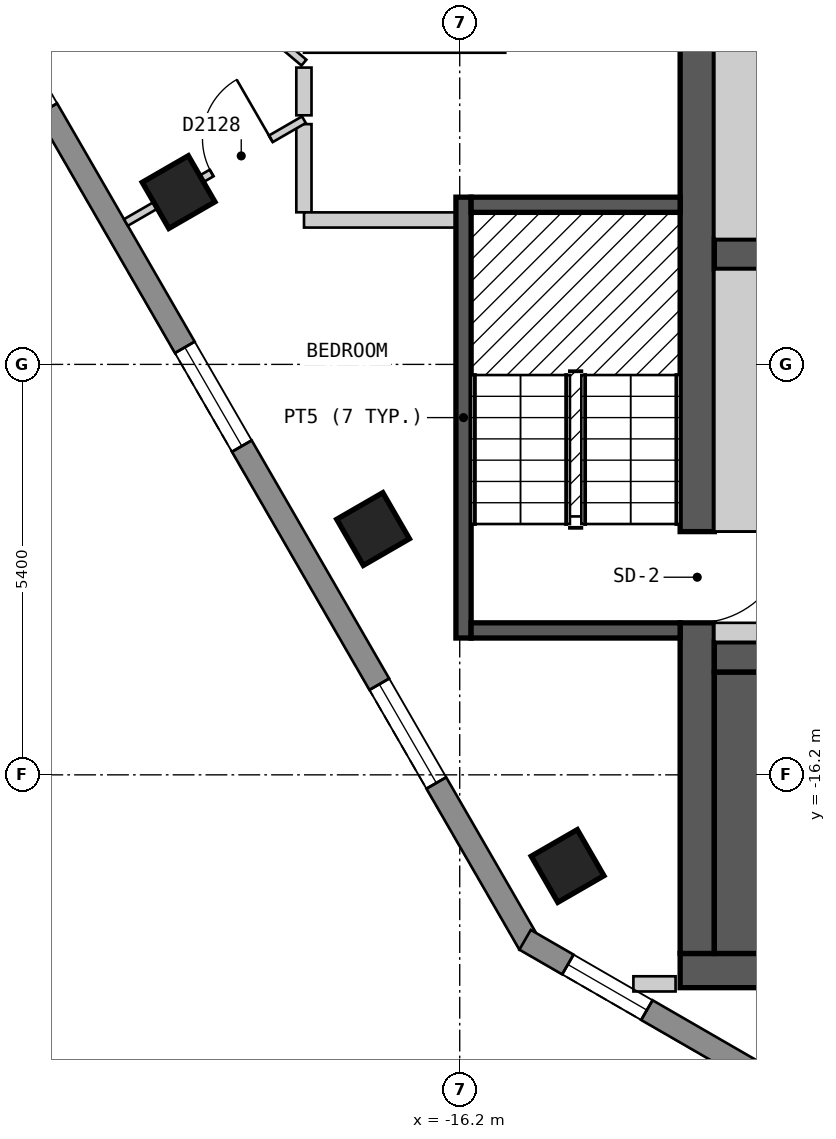
"""IFC4 building model, lengths in metres.
Left out: names, types, materials, properties, quantities, classifications, styles, units other than length and angle.
Written with IfcOpenShell. Run it as: python <this file> out.ifc"""

import sys

from ifc_helpers import new_model, si_unit, direction, frame, frame_2d, origin, origin_2d, place, context, subcontext, project, spatial, polyline, rectangle, outline, extrude, element, fill, save


model = new_model("IFC4")
c1 = context("Model", 3, precision=1e-05, world=origin(), true_north=direction((0.0, 1.0)))
c2 = subcontext(c1, "Body", "Model", "MODEL_VIEW")
j1 = project(units=[si_unit("LENGTHUNIT", "METRE"), si_unit("PLANEANGLEUNIT", "RADIAN")], contexts=[c1])
p1 = place(None, origin())
s1 = spatial("IfcSite", under=j1, at=p1, CompositionType="ELEMENT")
p2 = place(p1, origin())
s2 = spatial("IfcBuilding", under=s1, at=p2, CompositionType="ELEMENT")
p3 = place(p2, frame((0.0, 0.0, 211.8)))
s3 = spatial("IfcBuildingStorey", under=s2, at=p3, CompositionType="ELEMENT", Elevation=211.8)
for number, where, z_axis, x_axis in (
    (1, (-19.899, -8.533, 0.0), (0.0, 0.0, 1.0), (0.5, -0.866, 0.0)),
    (2, (-17.34, -12.966, 0.0), (0.0, 0.0, 1.0), (0.5, -0.866, 0.0)),
    (3, (-14.781, -17.399, 0.0), (0.0, 0.0, 1.0), (0.5, -0.866, 0.0)),
):
    element("IfcColumn", number, at=place(p3, frame(where, z_axis=z_axis, x_axis=x_axis)), inside=s3, PredefinedType="COLUMN", context=c2, shape_type="SweptSolid", body=[
        extrude(rectangle(XDim=0.7, YDim=0.7, at=origin_2d()), origin(), (0.0, 0.0, 1.0), 3.0),
    ])
p4 = place(p3, frame((-13.3, -18.775, 0.0), z_axis=(0.0, 0.0, 1.0), x_axis=(1.0, 0.0, 0.0)))
e4 = element("IfcWall", 4, at=p4, inside=s3, PredefinedType="SHEAR", context=c2, shape_type="SweptSolid", body=[
    extrude(rectangle(XDim=26.6, YDim=0.45, at=frame_2d((13.3, 0.0))), origin(), (0.0, 0.0, 1.0), 2.7),
])
p5 = place(p4, frame((10.25, 0.0, 0.0)))
e5 = element("IfcOpeningElement", 5, at=p5, cuts=e4, PredefinedType="OPENING", context=c2, shape_type="SweptSolid", body=[
    extrude(rectangle(XDim=0.9, YDim=2.1, at=frame_2d((0.45, 1.05))), frame((0.0, 0.235, 0.0), z_axis=(0.0, -1.0, 0.0), x_axis=(1.0, 0.0, 0.0)), (0.0, 0.0, 1.0), 0.47),
])
p6 = place(p3, frame((-13.075, -18.55, 0.0), z_axis=(0.0, 0.0, 1.0), x_axis=(0.0, 1.0, 0.0)))
e6 = element("IfcWall", 6, at=p6, inside=s3, PredefinedType="SHEAR", context=c2, shape_type="SweptSolid", body=[
    extrude(rectangle(XDim=13.1, YDim=0.45, at=frame_2d((6.55, 0.0))), origin(), (0.0, 0.0, 1.0), 2.7),
])
p7 = place(p6, frame((4.35, 0.0, 0.0)))
e7 = element("IfcOpeningElement", 7, at=p7, cuts=e6, PredefinedType="OPENING", context=c2, shape_type="SweptSolid", body=[
    extrude(rectangle(XDim=1.2, YDim=2.1, at=frame_2d((0.6, 1.05))), frame((0.0, 0.235, 0.0), z_axis=(0.0, -1.0, 0.0), x_axis=(1.0, 0.0, 0.0)), (0.0, 0.0, 1.0), 0.47),
])
p8 = place(p3, frame((-12.85, -14.65, 0.0), z_axis=(0.0, 0.0, 1.0), x_axis=(1.0, 0.0, 0.0)))
e8 = element("IfcWall", 8, at=p8, inside=s3, PredefinedType="SHEAR", context=c2, shape_type="SweptSolid", body=[
    extrude(rectangle(XDim=25.7, YDim=0.4, at=frame_2d((12.85, 0.0))), origin(), (0.0, 0.0, 1.0), 2.7),
])
p9 = place(p8, frame((2.05, 0.0, 0.0), z_axis=(0.0, 0.0, 1.0), x_axis=(-1.0, 0.0, 0.0)))
e9 = element("IfcOpeningElement", 9, at=p9, cuts=e8, PredefinedType="OPENING", context=c2, shape_type="SweptSolid", body=[
    extrude(rectangle(XDim=1.2, YDim=2.1, at=frame_2d((0.6, 1.05))), frame((0.0, 0.21, 0.0), z_axis=(0.0, -1.0, 0.0), x_axis=(1.0, 0.0, 0.0)), (0.0, 0.0, 1.0), 0.42),
])
p10 = place(p8, frame((24.9, 0.0, 0.0), z_axis=(0.0, 0.0, 1.0), x_axis=(-1.0, 0.0, 0.0)))
e10 = element("IfcOpeningElement", 10, at=p10, cuts=e8, PredefinedType="OPENING", context=c2, shape_type="SweptSolid", body=[
    extrude(rectangle(XDim=1.2, YDim=2.1, at=frame_2d((0.6, 1.05))), frame((0.0, 0.21, 0.0), z_axis=(0.0, -1.0, 0.0), x_axis=(1.0, 0.0, 0.0)), (0.0, 0.0, 1.0), 0.42),
])
p11 = place(p8, frame((10.0, 0.0, 0.0), z_axis=(0.0, 0.0, 1.0), x_axis=(-1.0, 0.0, 0.0)))
e11 = element("IfcOpeningElement", 11, at=p11, cuts=e8, PredefinedType="OPENING", context=c2, shape_type="SweptSolid", body=[
    extrude(rectangle(XDim=1.0, YDim=2.1, at=frame_2d((0.5, 1.05))), frame((0.0, 0.21, 0.0), z_axis=(0.0, -1.0, 0.0), x_axis=(1.0, 0.0, 0.0)), (0.0, 0.0, 1.0), 0.42),
])
p12 = place(p8, frame((16.4, 0.0, 0.0), z_axis=(0.0, 0.0, 1.0), x_axis=(-1.0, 0.0, 0.0)))
e12 = element("IfcOpeningElement", 12, at=p12, cuts=e8, PredefinedType="OPENING", context=c2, shape_type="SweptSolid", body=[
    extrude(rectangle(XDim=1.0, YDim=2.1, at=frame_2d((0.5, 1.05))), frame((0.0, 0.21, 0.0), z_axis=(0.0, -1.0, 0.0), x_axis=(1.0, 0.0, 0.0)), (0.0, 0.0, 1.0), 0.42),
])
p13 = place(p3, frame((-12.85, -9.35, 0.0), z_axis=(0.0, 0.0, 1.0), x_axis=(1.0, 0.0, 0.0)))
e13 = element("IfcWall", 13, at=p13, inside=s3, PredefinedType="SHEAR", context=c2, shape_type="SweptSolid", body=[
    extrude(rectangle(XDim=23.05, YDim=0.4, at=frame_2d((11.525, 0.0))), origin(), (0.0, 0.0, 1.0), 2.7),
])
p14 = place(p13, frame((1.45, 0.0, 0.0)))
e14 = element("IfcOpeningElement", 14, at=p14, cuts=e13, PredefinedType="OPENING", context=c2, shape_type="SweptSolid", body=[
    extrude(rectangle(XDim=1.1, YDim=2.1, at=frame_2d((0.55, 1.05))), frame((0.0, 0.21, 0.0), z_axis=(0.0, -1.0, 0.0), x_axis=(1.0, 0.0, 0.0)), (0.0, 0.0, 1.0), 0.42),
])
p15 = place(p13, frame((4.25, 0.0, 0.0)))
e15 = element("IfcOpeningElement", 15, at=p15, cuts=e13, PredefinedType="OPENING", context=c2, shape_type="SweptSolid", body=[
    extrude(rectangle(XDim=1.1, YDim=2.1, at=frame_2d((0.55, 1.05))), frame((0.0, 0.21, 0.0), z_axis=(0.0, -1.0, 0.0), x_axis=(1.0, 0.0, 0.0)), (0.0, 0.0, 1.0), 0.42),
])
p16 = place(p13, frame((7.05, 0.0, 0.0)))
e16 = element("IfcOpeningElement", 16, at=p16, cuts=e13, PredefinedType="OPENING", context=c2, shape_type="SweptSolid", body=[
    extrude(rectangle(XDim=1.1, YDim=2.1, at=frame_2d((0.55, 1.05))), frame((0.0, 0.21, 0.0), z_axis=(0.0, -1.0, 0.0), x_axis=(1.0, 0.0, 0.0)), (0.0, 0.0, 1.0), 0.42),
])
p17 = place(p13, frame((9.35, 0.0, 0.0)))
e17 = element("IfcOpeningElement", 17, at=p17, cuts=e13, PredefinedType="OPENING", context=c2, shape_type="SweptSolid", body=[
    extrude(rectangle(XDim=1.1, YDim=2.1, at=frame_2d((0.55, 1.05))), frame((0.0, 0.21, 0.0), z_axis=(0.0, -1.0, 0.0), x_axis=(1.0, 0.0, 0.0)), (0.0, 0.0, 1.0), 0.42),
])
p18 = place(p13, frame((11.65, 0.0, 0.0)))
e18 = element("IfcOpeningElement", 18, at=p18, cuts=e13, PredefinedType="OPENING", context=c2, shape_type="SweptSolid", body=[
    extrude(rectangle(XDim=1.1, YDim=2.1, at=frame_2d((0.55, 1.05))), frame((0.0, 0.21, 0.0), z_axis=(0.0, -1.0, 0.0), x_axis=(1.0, 0.0, 0.0)), (0.0, 0.0, 1.0), 0.42),
])
p19 = place(p13, frame((13.95, 0.0, 0.0)))
e19 = element("IfcOpeningElement", 19, at=p19, cuts=e13, PredefinedType="OPENING", context=c2, shape_type="SweptSolid", body=[
    extrude(rectangle(XDim=1.1, YDim=2.1, at=frame_2d((0.55, 1.05))), frame((0.0, 0.21, 0.0), z_axis=(0.0, -1.0, 0.0), x_axis=(1.0, 0.0, 0.0)), (0.0, 0.0, 1.0), 0.42),
])
p20 = place(p13, frame((16.25, 0.0, 0.0)))
e20 = element("IfcOpeningElement", 20, at=p20, cuts=e13, PredefinedType="OPENING", context=c2, shape_type="SweptSolid", body=[
    extrude(rectangle(XDim=1.1, YDim=2.1, at=frame_2d((0.55, 1.05))), frame((0.0, 0.21, 0.0), z_axis=(0.0, -1.0, 0.0), x_axis=(1.0, 0.0, 0.0)), (0.0, 0.0, 1.0), 0.42),
])
p21 = place(p13, frame((18.55, 0.0, 0.0)))
e21 = element("IfcOpeningElement", 21, at=p21, cuts=e13, PredefinedType="OPENING", context=c2, shape_type="SweptSolid", body=[
    extrude(rectangle(XDim=1.1, YDim=2.1, at=frame_2d((0.55, 1.05))), frame((0.0, 0.21, 0.0), z_axis=(0.0, -1.0, 0.0), x_axis=(1.0, 0.0, 0.0)), (0.0, 0.0, 1.0), 0.42),
])
p22 = place(p13, frame((20.95, 0.0, 0.0)))
e22 = element("IfcOpeningElement", 22, at=p22, cuts=e13, PredefinedType="OPENING", context=c2, shape_type="SweptSolid", body=[
    extrude(rectangle(XDim=1.1, YDim=2.1, at=frame_2d((0.55, 1.05))), frame((0.0, 0.21, 0.0), z_axis=(0.0, -1.0, 0.0), x_axis=(1.0, 0.0, 0.0)), (0.0, 0.0, 1.0), 0.42),
])
p23 = place(p3, frame((-23.599, -4.025, 0.0), z_axis=(0.0, 0.0, 1.0), x_axis=(0.500012653391, -0.866018098222, 0.0)))
e23 = element("IfcWall", 23, at=p23, inside=s3, PredefinedType="SOLIDWALL", context=c2, shape_type="SweptSolid", body=[
    extrude(outline(polyline([(0.0, -0.15), (16.628, -0.15), (16.548, 0.15), (0.08, 0.15), (0.0, -0.15)])), origin(), (0.0, 0.0, 1.0), 2.7),
])
p24 = place(p23, frame((2.444, 0.0, 0.15)))
e24 = element("IfcOpeningElement", 24, at=p24, cuts=e23, PredefinedType="OPENING", context=c2, shape_type="SweptSolid", body=[
    extrude(rectangle(XDim=1.5, YDim=2.1, at=frame_2d((0.75, 1.05))), frame((0.0, 0.16, 0.0), z_axis=(0.0, -1.0, 0.0), x_axis=(1.0, 0.0, 0.0)), (0.0, 0.0, 1.0), 0.32),
])
p25 = place(p23, frame((7.564, 0.0, 0.15)))
e25 = element("IfcOpeningElement", 25, at=p25, cuts=e23, PredefinedType="OPENING", context=c2, shape_type="SweptSolid", body=[
    extrude(rectangle(XDim=1.5, YDim=2.1, at=frame_2d((0.75, 1.05))), frame((0.0, 0.16, 0.0), z_axis=(0.0, -1.0, 0.0), x_axis=(1.0, 0.0, 0.0)), (0.0, 0.0, 1.0), 0.32),
])
p26 = place(p23, frame((12.682, 0.0, 0.15)))
e26 = element("IfcOpeningElement", 26, at=p26, cuts=e23, PredefinedType="OPENING", context=c2, shape_type="SweptSolid", body=[
    extrude(rectangle(XDim=1.5, YDim=2.1, at=frame_2d((0.75, 1.05))), frame((0.0, 0.16, 0.0), z_axis=(0.0, -1.0, 0.0), x_axis=(1.0, 0.0, 0.0)), (0.0, 0.0, 1.0), 0.32),
])
p27 = place(p3, frame((-15.34, -18.37, 0.0), z_axis=(0.0, 0.0, 1.0), x_axis=(0.866022959057, -0.500004234368, 0.0)))
e27 = element("IfcWall", 27, at=p27, inside=s3, PredefinedType="SOLIDWALL", context=c2, shape_type="SweptSolid", body=[
    extrude(outline(polyline([(0.0, -0.15), (5.0, -0.15), (4.92, 0.15), (0.08, 0.15), (0.0, -0.15)])), origin(), (0.0, 0.0, 1.0), 2.7),
])
p28 = place(p27, frame((0.65, 0.0, 0.15)))
e28 = element("IfcOpeningElement", 28, at=p28, cuts=e27, PredefinedType="OPENING", context=c2, shape_type="SweptSolid", body=[
    extrude(rectangle(XDim=1.2, YDim=2.1, at=frame_2d((0.6, 1.05))), frame((0.0, 0.16, 0.0), z_axis=(0.0, -1.0, 0.0), x_axis=(1.0, 0.0, 0.0)), (0.0, 0.0, 1.0), 0.32),
])
p29 = place(p3, frame((-18.25, -7.639, 0.0), z_axis=(0.0, 0.0, 1.0), x_axis=(0.0, -1.0, 0.0)))
e29 = element("IfcWall", 29, at=p29, inside=s3, PredefinedType="PARTITIONING", context=c2, shape_type="SweptSolid", body=[
    extrude(rectangle(XDim=1.16, YDim=0.2, at=frame_2d((0.58, 0.0))), origin(), (0.0, 0.0, 1.0), 2.7),
])
p30 = place(p3, frame((-18.249, -6.6, 0.0), z_axis=(0.0, 0.0, 1.0), x_axis=(1.0, 0.0, 0.0)))
e30 = element("IfcWall", 30, at=p30, inside=s3, PredefinedType="PARTITIONING", context=c2, shape_type="SweptSolid", body=[
    extrude(rectangle(XDim=2.648, YDim=0.2, at=frame_2d((1.324, 0.0))), origin(), (0.0, 0.0, 1.0), 2.7),
])
p31 = place(p3, frame((-18.249, -8.9, 0.0), z_axis=(0.0, 0.0, 1.0), x_axis=(1.0, 0.0, 0.0)))
e31 = element("IfcWall", 31, at=p31, inside=s3, PredefinedType="PARTITIONING", context=c2, shape_type="SweptSolid", body=[
    extrude(rectangle(XDim=2.199, YDim=0.2, at=frame_2d((1.1, 0.0))), origin(), (0.0, 0.0, 1.0), 2.7),
])
p32 = place(p3, frame((-18.25, -7.523, 0.0), z_axis=(0.0, 0.0, 1.0), x_axis=(0.0, 1.0, 0.0)))
e32 = element("IfcWall", 32, at=p32, inside=s3, PredefinedType="PARTITIONING", context=c2, shape_type="SweptSolid", body=[
    extrude(rectangle(XDim=0.628, YDim=0.2, at=frame_2d((0.314, 0.0))), origin(), (0.0, 0.0, 1.0), 2.7),
])
p33 = place(p3, frame((-20.15, -5.223, 0.0), z_axis=(0.0, 0.0, 1.0), x_axis=(0.763471868926, -0.645841083672, 0.0)))
e33 = element("IfcWall", 33, at=p33, inside=s3, PredefinedType="PARTITIONING", context=c2, shape_type="SweptSolid", body=[
    extrude(rectangle(XDim=2.489, YDim=0.1, at=frame_2d((1.244, 0.0))), origin(), (0.0, 0.0, 1.0), 2.7),
])
p34 = place(p3, frame((-20.592, -8.933, 0.0), z_axis=(0.0, 0.0, 1.0), x_axis=(0.866045775131, 0.499964714133, 0.0)))
e34 = element("IfcWall", 34, at=p34, inside=s3, PredefinedType="PARTITIONING", context=c2, shape_type="SweptSolid", body=[
    extrude(rectangle(XDim=2.704, YDim=0.1, at=frame_2d((1.352, 0.0))), origin(), (0.0, 0.0, 1.0), 2.7),
])
p35 = place(p34, frame((1.302, 0.0, 0.0)))
e35 = element("IfcOpeningElement", 35, at=p35, cuts=e34, PredefinedType="OPENING", context=c2, shape_type="SweptSolid", body=[
    extrude(rectangle(XDim=0.9, YDim=2.1, at=frame_2d((0.45, 1.05))), frame((0.0, 0.06, 0.0), z_axis=(0.0, -1.0, 0.0), x_axis=(1.0, 0.0, 0.0)), (0.0, 0.0, 1.0), 0.12),
])
p36 = place(p3, frame((-13.915, -18.95, 0.0), z_axis=(0.0, 0.0, 1.0), x_axis=(1.0, 0.0, 0.0)))
e36 = element("IfcWall", 36, at=p36, inside=s3, PredefinedType="PARTITIONING", context=c2, shape_type="SweptSolid", body=[
    extrude(rectangle(XDim=0.555, YDim=0.2, at=frame_2d((0.277, 0.0))), origin(), (0.0, 0.0, 1.0), 2.7),
])
p37 = place(p3, frame((-16.15, -14.4, 0.0), z_axis=(0.0, 0.0, 1.0), x_axis=(0.0, 1.0, 0.0)))
e37 = element("IfcWall", 37, at=p37, inside=s3, PredefinedType="SOLIDWALL", context=c2, shape_type="SweptSolid", body=[
    extrude(rectangle(XDim=5.8, YDim=0.2, at=frame_2d((2.9, 0.0))), origin(), (0.0, 0.0, 1.0), 2.7),
])
for number, where, z_axis, x_axis in (
    (38, (-16.05, -14.3, 0.0), (0.0, 0.0, 1.0), (1.0, 0.0, 0.0)),
    (39, (-16.05, -8.7, 0.0), (0.0, 0.0, 1.0), (1.0, 0.0, 0.0)),
):
    element("IfcWall", number, at=place(p3, frame(where, z_axis=z_axis, x_axis=x_axis)), inside=s3, PredefinedType="SOLIDWALL", context=c2, shape_type="SweptSolid", body=[
        extrude(rectangle(XDim=2.75, YDim=0.2, at=frame_2d((1.375, 0.0))), origin(), (0.0, 0.0, 1.0), 2.7),
    ])
p38 = place(p3, frame((-12.475, -18.55, 0.0), z_axis=(0.0, 0.0, 1.0), x_axis=(0.0, 1.0, 0.0)))
e40 = element("IfcWall", 40, at=p38, inside=s3, PredefinedType="SOLIDWALL", context=c2, shape_type="SweptSolid", body=[
    extrude(rectangle(XDim=3.7, YDim=0.75, at=frame_2d((1.85, 0.0))), origin(), (0.0, 0.0, 1.0), 2.7),
])
p39 = place(p3, frame((-12.85, -14.325, 0.0), z_axis=(0.0, 0.0, 1.0), x_axis=(1.0, 0.0, 0.0)))
e41 = element("IfcWall", 41, at=p39, inside=s3, PredefinedType="PARTITIONING", context=c2, shape_type="SweptSolid", body=[
    extrude(rectangle(XDim=0.75, YDim=0.25, at=frame_2d((0.375, 0.0))), origin(), (0.0, 0.0, 1.0), 2.7),
])
p40 = place(p3, frame((-12.475, -13.0, 0.0), z_axis=(0.0, 0.0, 1.0), x_axis=(0.0, 1.0, 0.0)))
e42 = element("IfcWall", 42, at=p40, inside=s3, PredefinedType="PARTITIONING", context=c2, shape_type="SweptSolid", body=[
    extrude(rectangle(XDim=3.45, YDim=0.75, at=frame_2d((1.725, 0.0))), origin(), (0.0, 0.0, 1.0), 2.7),
])
p41 = place(p3, frame((-12.475, -9.15, 0.0), z_axis=(0.0, 0.0, 1.0), x_axis=(0.0, 1.0, 0.0)))
e43 = element("IfcWall", 43, at=p41, inside=s3, PredefinedType="SOLIDWALL", context=c2, shape_type="SweptSolid", body=[
    extrude(rectangle(XDim=3.7, YDim=0.75, at=frame_2d((1.85, 0.0))), origin(), (0.0, 0.0, 1.0), 2.7),
])
p42 = place(p25, origin())
e44 = element("IfcWindow", 44, at=p42, inside=s3, PartitioningType="SINGLE_PANEL", PredefinedType="WINDOW", context=c2, shape_type="SweptSolid", body=[
    extrude(rectangle(XDim=1.5, YDim=2.1, at=frame_2d((0.75, 1.05))), frame((0.0, 0.03, 0.0), z_axis=(0.0, -1.0, 0.0), x_axis=(1.0, 0.0, 0.0)), (0.0, 0.0, 1.0), 0.06),
])
fill(e25, e44)
p43 = place(p26, origin())
e45 = element("IfcWindow", 45, at=p43, inside=s3, PartitioningType="SINGLE_PANEL", PredefinedType="WINDOW", context=c2, shape_type="SweptSolid", body=[
    extrude(rectangle(XDim=1.5, YDim=2.1, at=frame_2d((0.75, 1.05))), frame((0.0, 0.03, 0.0), z_axis=(0.0, -1.0, 0.0), x_axis=(1.0, 0.0, 0.0)), (0.0, 0.0, 1.0), 0.06),
])
fill(e26, e45)
p44 = place(p28, origin())
e46 = element("IfcWindow", 46, at=p44, inside=s3, PartitioningType="SINGLE_PANEL", PredefinedType="WINDOW", context=c2, shape_type="SweptSolid", body=[
    extrude(rectangle(XDim=1.2, YDim=2.1, at=frame_2d((0.6, 1.05))), frame((0.0, 0.03, 0.0), z_axis=(0.0, -1.0, 0.0), x_axis=(1.0, 0.0, 0.0)), (0.0, 0.0, 1.0), 0.06),
])
fill(e28, e46)
p45 = place(p35, origin())
e47 = element("IfcDoor", 47, at=p45, inside=s3, OperationType="SINGLE_SWING_RIGHT", PredefinedType="DOOR", context=c2, shape_type="SweptSolid", body=[
    extrude(rectangle(XDim=0.9, YDim=2.1, at=frame_2d((0.45, 1.05))), frame((0.0, 0.025, 0.0), z_axis=(0.0, -1.0, 0.0), x_axis=(1.0, 0.0, 0.0)), (0.0, 0.0, 1.0), 0.05),
])
fill(e35, e47)
p46 = place(p7, origin())
e48 = element("IfcDoor", 48, at=p46, inside=s3, OperationType="SINGLE_SWING_RIGHT", PredefinedType="DOOR", context=c2, shape_type="SweptSolid", body=[
    extrude(rectangle(XDim=1.2, YDim=2.1, at=frame_2d((0.6, 1.05))), frame((0.0, 0.025, 0.0), z_axis=(0.0, -1.0, 0.0), x_axis=(1.0, 0.0, 0.0)), (0.0, 0.0, 1.0), 0.05),
])
fill(e7, e48)
save(model, sys.argv[1])
